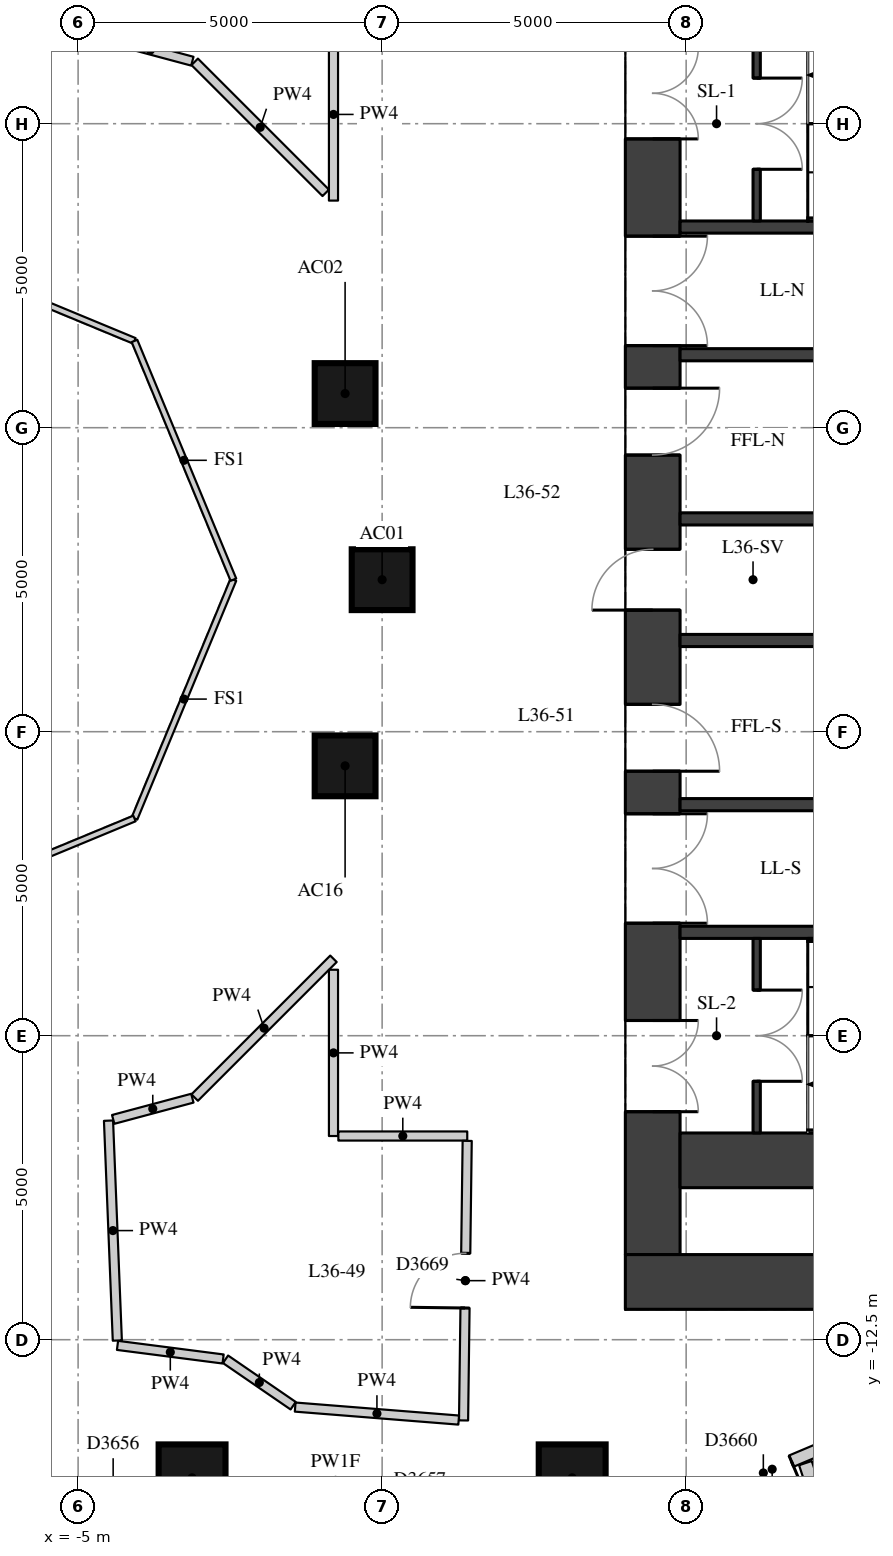
"""IFC4 building model, lengths in metres.
Left out: names, types, materials, properties, quantities, classifications, styles, units other than length and angle.
Written with IfcOpenShell. Run it as: python <this file> out.ifc"""

import sys

from ifc_helpers import new_model, si_unit, direction, frame, frame_2d, origin, origin_2d, place, context, subcontext, project, spatial, rectangle, extrude, element, fill, save


model = new_model("IFC4")
c1 = context("Model", 3, precision=1e-05, world=origin(), true_north=direction((0.0, 1.0)))
c2 = subcontext(c1, "Body", "Model", "MODEL_VIEW")
j1 = project(units=[si_unit("LENGTHUNIT", "METRE"), si_unit("PLANEANGLEUNIT", "RADIAN")], contexts=[c1])
p1 = place(None, origin())
s1 = spatial("IfcSite", under=j1, at=p1, CompositionType="ELEMENT")
p2 = place(p1, origin())
s2 = spatial("IfcBuilding", under=s1, at=p2, CompositionType="ELEMENT")
p3 = place(p2, frame((0.0, 0.0, 128.5)))
s3 = spatial("IfcBuildingStorey", under=s2, at=p3, CompositionType="ELEMENT", Elevation=128.5)
for number, where, z_axis, x_axis in (
    (1, (0.0, 0.0, 0.0), (0.0, 0.0, 1.0), (1.0, 0.0, 0.0)),
    (2, (-0.609, 3.062, 0.0), (0.0, 0.0, 1.0), (1.0, 0.0, 0.0)),
    (3, (-0.609, -3.062, 0.0), (0.0, 0.0, 1.0), (1.0, 0.0, 0.0)),
):
    element("IfcColumn", number, at=place(p3, frame(where, z_axis=z_axis, x_axis=x_axis)), inside=s3, PredefinedType="COLUMN", context=c2, shape_type="SweptSolid", body=[
        extrude(rectangle(XDim=1.0, YDim=1.0, at=origin_2d()), origin(), (0.0, 0.0, 1.0), 3.3),
    ])
for number, where, z_axis, x_axis in (
    (4, (-3.126, -14.772, 0.0), (0.0, 0.0, 1.0), (1.0, 0.0, 0.0)),
    (5, (3.126, -14.772, 0.0), (0.0, 0.0, 1.0), (1.0, 0.0, 0.0)),
):
    element("IfcColumn", number, at=place(p3, frame(where, z_axis=z_axis, x_axis=x_axis)), inside=s3, PredefinedType="COLUMN", context=c2, shape_type="SweptSolid", body=[
        extrude(rectangle(XDim=1.1, YDim=1.1, at=origin_2d()), origin(), (0.0, 0.0, 1.0), 3.3),
    ])
p4 = place(p3, frame((4.45, -11.1, 0.0), z_axis=(0.0, 0.0, 1.0), x_axis=(0.0, 1.0, 0.0)))
e6 = element("IfcWall", 6, at=p4, inside=s3, PredefinedType="SHEAR", context=c2, shape_type="SweptSolid", body=[
    extrude(rectangle(XDim=22.2, YDim=0.9, at=frame_2d((11.1, 0.0))), origin(), (0.0, 0.0, 1.0), 3.02),
])
p5 = place(p4, frame((2.35, 0.0, 0.0)))
e7 = element("IfcOpeningElement", 7, at=p5, cuts=e6, PredefinedType="OPENING", context=c2, shape_type="SweptSolid", body=[
    extrude(rectangle(XDim=1.5, YDim=2.1, at=frame_2d((0.75, 1.05))), frame((0.0, 0.46, 0.0), z_axis=(0.0, -1.0, 0.0), x_axis=(1.0, 0.0, 0.0)), (0.0, 0.0, 1.0), 0.92),
])
p6 = place(p4, frame((5.45, 0.0, 0.0)))
e8 = element("IfcOpeningElement", 8, at=p6, cuts=e6, PredefinedType="OPENING", context=c2, shape_type="SweptSolid", body=[
    extrude(rectangle(XDim=1.8, YDim=2.1, at=frame_2d((0.9, 1.05))), frame((0.0, 0.46, 0.0), z_axis=(0.0, -1.0, 0.0), x_axis=(1.0, 0.0, 0.0)), (0.0, 0.0, 1.0), 0.92),
])
p7 = place(p4, frame((7.95, 0.0, 0.0)))
e9 = element("IfcOpeningElement", 9, at=p7, cuts=e6, PredefinedType="OPENING", context=c2, shape_type="SweptSolid", body=[
    extrude(rectangle(XDim=1.1, YDim=2.1, at=frame_2d((0.55, 1.05))), frame((0.0, 0.46, 0.0), z_axis=(0.0, -1.0, 0.0), x_axis=(1.0, 0.0, 0.0)), (0.0, 0.0, 1.0), 0.92),
])
p8 = place(p4, frame((10.6, 0.0, 0.0)))
e10 = element("IfcOpeningElement", 10, at=p8, cuts=e6, PredefinedType="OPENING", context=c2, shape_type="SweptSolid", body=[
    extrude(rectangle(XDim=1.0, YDim=2.1, at=frame_2d((0.5, 1.05))), frame((0.0, 0.46, 0.0), z_axis=(0.0, -1.0, 0.0), x_axis=(1.0, 0.0, 0.0)), (0.0, 0.0, 1.0), 0.92),
])
p9 = place(p4, frame((13.15, 0.0, 0.0)))
e11 = element("IfcOpeningElement", 11, at=p9, cuts=e6, PredefinedType="OPENING", context=c2, shape_type="SweptSolid", body=[
    extrude(rectangle(XDim=1.1, YDim=2.1, at=frame_2d((0.55, 1.05))), frame((0.0, 0.46, 0.0), z_axis=(0.0, -1.0, 0.0), x_axis=(1.0, 0.0, 0.0)), (0.0, 0.0, 1.0), 0.92),
])
p10 = place(p4, frame((14.95, 0.0, 0.0)))
e12 = element("IfcOpeningElement", 12, at=p10, cuts=e6, PredefinedType="OPENING", context=c2, shape_type="SweptSolid", body=[
    extrude(rectangle(XDim=1.8, YDim=2.1, at=frame_2d((0.9, 1.05))), frame((0.0, 0.46, 0.0), z_axis=(0.0, -1.0, 0.0), x_axis=(1.0, 0.0, 0.0)), (0.0, 0.0, 1.0), 0.92),
])
p11 = place(p4, frame((18.35, 0.0, 0.0)))
e13 = element("IfcOpeningElement", 13, at=p11, cuts=e6, PredefinedType="OPENING", context=c2, shape_type="SweptSolid", body=[
    extrude(rectangle(XDim=1.5, YDim=2.1, at=frame_2d((0.75, 1.05))), frame((0.0, 0.46, 0.0), z_axis=(0.0, -1.0, 0.0), x_axis=(1.0, 0.0, 0.0)), (0.0, 0.0, 1.0), 0.92),
])
p12 = place(p3, frame((4.0, -11.55, 0.0), z_axis=(0.0, 0.0, 1.0), x_axis=(1.0, 0.0, 0.0)))
e14 = element("IfcWall", 14, at=p12, inside=s3, PredefinedType="SHEAR", context=c2, shape_type="SweptSolid", body=[
    extrude(rectangle(XDim=15.2, YDim=0.9, at=frame_2d((7.6, 0.0))), origin(), (0.0, 0.0, 1.0), 3.02),
])
p13 = place(p3, frame((4.9, -9.55, 0.0), z_axis=(0.0, 0.0, 1.0), x_axis=(1.0, 0.0, 0.0)))
e15 = element("IfcWall", 15, at=p13, inside=s3, PredefinedType="SHEAR", context=c2, shape_type="SweptSolid", body=[
    extrude(rectangle(XDim=10.2, YDim=0.9, at=frame_2d((5.1, 0.0))), origin(), (0.0, 0.0, 1.0), 3.02),
])
p14 = place(p3, frame((4.9, 5.8, 0.0), z_axis=(0.0, 0.0, 1.0), x_axis=(1.0, 0.0, 0.0)))
e16 = element("IfcWall", 16, at=p14, inside=s3, PredefinedType="SHEAR", context=c2, shape_type="SweptSolid", body=[
    extrude(rectangle(XDim=10.2, YDim=0.2, at=frame_2d((5.1, 0.0))), origin(), (0.0, 0.0, 1.0), 3.02),
])
p15 = place(p14, frame((6.75, 0.0, 0.0)))
e17 = element("IfcOpeningElement", 17, at=p15, cuts=e16, PredefinedType="OPENING", context=c2, shape_type="SweptSolid", body=[
    extrude(rectangle(XDim=1.1, YDim=2.1, at=frame_2d((0.55, 1.05))), frame((0.0, 0.11, 0.0), z_axis=(0.0, -1.0, 0.0), x_axis=(1.0, 0.0, 0.0)), (0.0, 0.0, 1.0), 0.22),
])
p16 = place(p14, frame((8.75, 0.0, 0.0)))
e18 = element("IfcOpeningElement", 18, at=p16, cuts=e16, PredefinedType="OPENING", context=c2, shape_type="SweptSolid", body=[
    extrude(rectangle(XDim=1.1, YDim=2.1, at=frame_2d((0.55, 1.05))), frame((0.0, 0.11, 0.0), z_axis=(0.0, -1.0, 0.0), x_axis=(1.0, 0.0, 0.0)), (0.0, 0.0, 1.0), 0.22),
])
p17 = place(p3, frame((4.9, 3.7, 0.0), z_axis=(0.0, 0.0, 1.0), x_axis=(1.0, 0.0, 0.0)))
e19 = element("IfcWall", 19, at=p17, inside=s3, PredefinedType="SHEAR", context=c2, shape_type="SweptSolid", body=[
    extrude(rectangle(XDim=10.2, YDim=0.2, at=frame_2d((5.1, 0.0))), origin(), (0.0, 0.0, 1.0), 3.02),
])
p18 = place(p17, frame((6.3, 0.0, 0.0)))
e20 = element("IfcOpeningElement", 20, at=p18, cuts=e19, PredefinedType="OPENING", context=c2, shape_type="SweptSolid", body=[
    extrude(rectangle(XDim=1.1, YDim=2.1, at=frame_2d((0.55, 1.05))), frame((0.0, 0.11, 0.0), z_axis=(0.0, -1.0, 0.0), x_axis=(1.0, 0.0, 0.0)), (0.0, 0.0, 1.0), 0.22),
])
p19 = place(p17, frame((8.6, 0.0, 0.0)))
e21 = element("IfcOpeningElement", 21, at=p19, cuts=e19, PredefinedType="OPENING", context=c2, shape_type="SweptSolid", body=[
    extrude(rectangle(XDim=1.1, YDim=2.1, at=frame_2d((0.55, 1.05))), frame((0.0, 0.11, 0.0), z_axis=(0.0, -1.0, 0.0), x_axis=(1.0, 0.0, 0.0)), (0.0, 0.0, 1.0), 0.22),
])
for number, where, z_axis, x_axis in (
    (22, (4.9, 1.0, 0.0), (0.0, 0.0, 1.0), (1.0, 0.0, 0.0)),
    (23, (4.9, -1.0, 0.0), (0.0, 0.0, 1.0), (1.0, 0.0, 0.0)),
):
    element("IfcWall", number, at=place(p3, frame(where, z_axis=z_axis, x_axis=x_axis)), inside=s3, PredefinedType="SHEAR", context=c2, shape_type="SweptSolid", body=[
        extrude(rectangle(XDim=10.2, YDim=0.2, at=frame_2d((5.1, 0.0))), origin(), (0.0, 0.0, 1.0), 3.02),
    ])
p20 = place(p3, frame((4.9, -3.7, 0.0), z_axis=(0.0, 0.0, 1.0), x_axis=(1.0, 0.0, 0.0)))
e24 = element("IfcWall", 24, at=p20, inside=s3, PredefinedType="SHEAR", context=c2, shape_type="SweptSolid", body=[
    extrude(rectangle(XDim=10.2, YDim=0.2, at=frame_2d((5.1, 0.0))), origin(), (0.0, 0.0, 1.0), 3.02),
])
p21 = place(p20, frame((6.3, 0.0, 0.0)))
e25 = element("IfcOpeningElement", 25, at=p21, cuts=e24, PredefinedType="OPENING", context=c2, shape_type="SweptSolid", body=[
    extrude(rectangle(XDim=1.1, YDim=2.1, at=frame_2d((0.55, 1.05))), frame((0.0, 0.11, 0.0), z_axis=(0.0, -1.0, 0.0), x_axis=(1.0, 0.0, 0.0)), (0.0, 0.0, 1.0), 0.22),
])
p22 = place(p20, frame((8.6, 0.0, 0.0)))
e26 = element("IfcOpeningElement", 26, at=p22, cuts=e24, PredefinedType="OPENING", context=c2, shape_type="SweptSolid", body=[
    extrude(rectangle(XDim=1.1, YDim=2.1, at=frame_2d((0.55, 1.05))), frame((0.0, 0.11, 0.0), z_axis=(0.0, -1.0, 0.0), x_axis=(1.0, 0.0, 0.0)), (0.0, 0.0, 1.0), 0.22),
])
p23 = place(p3, frame((4.9, -5.8, 0.0), z_axis=(0.0, 0.0, 1.0), x_axis=(1.0, 0.0, 0.0)))
e27 = element("IfcWall", 27, at=p23, inside=s3, PredefinedType="SHEAR", context=c2, shape_type="SweptSolid", body=[
    extrude(rectangle(XDim=10.2, YDim=0.2, at=frame_2d((5.1, 0.0))), origin(), (0.0, 0.0, 1.0), 3.02),
])
p24 = place(p3, frame((6.16, 5.9, 0.0), z_axis=(0.0, 0.0, 1.0), x_axis=(0.0, 1.0, 0.0)))
e28 = element("IfcWall", 28, at=p24, inside=s3, PredefinedType="SHEAR", context=c2, shape_type="SweptSolid", body=[
    extrude(rectangle(XDim=3.2, YDim=0.12, at=frame_2d((1.6, 0.0))), origin(), (0.0, 0.0, 1.0), 3.02),
])
p25 = place(p24, frame((0.85, 0.0, 0.0)))
e29 = element("IfcOpeningElement", 29, at=p25, cuts=e28, PredefinedType="OPENING", context=c2, shape_type="SweptSolid", body=[
    extrude(rectangle(XDim=1.5, YDim=2.1, at=frame_2d((0.75, 1.05))), frame((0.0, 0.07, 0.0), z_axis=(0.0, -1.0, 0.0), x_axis=(1.0, 0.0, 0.0)), (0.0, 0.0, 1.0), 0.14),
])
p26 = place(p3, frame((6.16, -9.1, 0.0), z_axis=(0.0, 0.0, 1.0), x_axis=(0.0, 1.0, 0.0)))
e30 = element("IfcWall", 30, at=p26, inside=s3, PredefinedType="SHEAR", context=c2, shape_type="SweptSolid", body=[
    extrude(rectangle(XDim=3.2, YDim=0.12, at=frame_2d((1.6, 0.0))), origin(), (0.0, 0.0, 1.0), 3.02),
])
p27 = place(p26, frame((0.85, 0.0, 0.0)))
e31 = element("IfcOpeningElement", 31, at=p27, cuts=e30, PredefinedType="OPENING", context=c2, shape_type="SweptSolid", body=[
    extrude(rectangle(XDim=1.5, YDim=2.1, at=frame_2d((0.75, 1.05))), frame((0.0, 0.07, 0.0), z_axis=(0.0, -1.0, 0.0), x_axis=(1.0, 0.0, 0.0)), (0.0, 0.0, 1.0), 0.14),
])
p28 = place(p3, frame((8.818, -13.616, 0.0), z_axis=(0.0, 0.0, 1.0), x_axis=(-0.921304705085, -0.388841407759, 0.0)))
e32 = element("IfcWall", 32, at=p28, inside=s3, PredefinedType="PARTITIONING", context=c2, shape_type="SweptSolid", body=[
    extrude(rectangle(XDim=5.217, YDim=0.2, at=frame_2d((2.608, 0.0))), origin(), (0.0, 0.0, 1.0), 3.02),
])
p29 = place(p28, frame((2.266, 0.0, 0.0)))
e33 = element("IfcOpeningElement", 33, at=p29, cuts=e32, PredefinedType="OPENING", context=c2, shape_type="SweptSolid", body=[
    extrude(rectangle(XDim=1.0, YDim=2.1, at=frame_2d((0.5, 1.05))), frame((0.0, 0.11, 0.0), z_axis=(0.0, -1.0, 0.0), x_axis=(1.0, 0.0, 0.0)), (0.0, 0.0, 1.0), 0.22),
])
p30 = place(p3, frame((-0.8, 9.07, 0.0), z_axis=(0.0, 0.0, 1.0), x_axis=(0.0, -1.0, 0.0)))
e34 = element("IfcWall", 34, at=p30, inside=s3, PredefinedType="PARTITIONING", context=c2, shape_type="SweptSolid", body=[
    extrude(rectangle(XDim=2.835, YDim=0.15, at=frame_2d((1.417, 0.0))), origin(), (0.0, 0.0, 1.0), 3.02),
])
p31 = place(p3, frame((-0.927, 6.363, 0.0), z_axis=(0.0, 0.0, 1.0), x_axis=(-0.707106781187, 0.707106781187, 0.0)))
e35 = element("IfcWall", 35, at=p31, inside=s3, PredefinedType="PARTITIONING", context=c2, shape_type="SweptSolid", body=[
    extrude(rectangle(XDim=3.048, YDim=0.15, at=frame_2d((1.524, 0.0))), origin(), (0.0, 0.0, 1.0), 3.02),
])
p32 = place(p3, frame((-3.121, 8.528, 0.0), z_axis=(0.0, 0.0, 1.0), x_axis=(-0.965941945062, 0.258758881529, 0.0)))
e36 = element("IfcWall", 36, at=p32, inside=s3, PredefinedType="PARTITIONING", context=c2, shape_type="SweptSolid", body=[
    extrude(rectangle(XDim=1.427, YDim=0.15, at=frame_2d((0.714, 0.0))), origin(), (0.0, 0.0, 1.0), 2.47),
])
p33 = place(p3, frame((-3.083, -8.518, 0.0), z_axis=(0.0, 0.0, 1.0), x_axis=(0.707106781187, 0.707106781187, 0.0)))
e37 = element("IfcWall", 37, at=p33, inside=s3, PredefinedType="PARTITIONING", context=c2, shape_type="SweptSolid", body=[
    extrude(rectangle(XDim=3.228, YDim=0.15, at=frame_2d((1.614, 0.0))), origin(), (0.0, 0.0, 1.0), 3.02),
])
p34 = place(p3, frame((-0.8, -6.415, 0.0), z_axis=(0.0, 0.0, 1.0), x_axis=(0.0, -1.0, 0.0)))
e38 = element("IfcWall", 38, at=p34, inside=s3, PredefinedType="PARTITIONING", context=c2, shape_type="SweptSolid", body=[
    extrude(rectangle(XDim=2.735, YDim=0.15, at=frame_2d((1.367, 0.0))), origin(), (0.0, 0.0, 1.0), 3.02),
])
p35 = place(p3, frame((-0.72, -9.15, 0.0), z_axis=(0.0, 0.0, 1.0), x_axis=(1.0, 0.0, 0.0)))
e39 = element("IfcWall", 39, at=p35, inside=s3, PredefinedType="PARTITIONING", context=c2, shape_type="SweptSolid", body=[
    extrude(rectangle(XDim=2.12, YDim=0.15, at=frame_2d((1.06, 0.0))), origin(), (0.0, 0.0, 1.0), 3.02),
])
p36 = place(p3, frame((1.399, -9.23, 0.0), z_axis=(0.0, 0.0, 1.0), x_axis=(-0.013008669764, -0.999915383676, 0.0)))
e40 = element("IfcWall", 40, at=p36, inside=s3, PredefinedType="PARTITIONING", context=c2, shape_type="SweptSolid", body=[
    extrude(rectangle(XDim=4.598, YDim=0.15, at=frame_2d((2.299, 0.0))), origin(), (0.0, 0.0, 1.0), 3.02),
])
p37 = place(p36, frame((1.849, 0.0, 0.0)))
e41 = element("IfcOpeningElement", 41, at=p37, cuts=e40, PredefinedType="OPENING", context=c2, shape_type="SweptSolid", body=[
    extrude(rectangle(XDim=0.9, YDim=2.1, at=frame_2d((0.45, 1.05))), frame((0.0, 0.085, 0.0), z_axis=(0.0, -1.0, 0.0), x_axis=(1.0, 0.0, 0.0)), (0.0, 0.0, 1.0), 0.17),
])
p38 = place(p3, frame((1.259, -13.822, 0.0), z_axis=(0.0, 0.0, 1.0), x_axis=(-0.996859157686, 0.079194821407, 0.0)))
e42 = element("IfcWall", 42, at=p38, inside=s3, PredefinedType="PARTITIONING", context=c2, shape_type="SweptSolid", body=[
    extrude(rectangle(XDim=2.698, YDim=0.15, at=frame_2d((1.349, 0.0))), origin(), (0.0, 0.0, 1.0), 3.02),
])
p39 = place(p3, frame((-1.463, -13.586, 0.0), z_axis=(0.0, 0.0, 1.0), x_axis=(-0.82445873192, 0.565922078878, 0.0)))
e43 = element("IfcWall", 43, at=p39, inside=s3, PredefinedType="PARTITIONING", context=c2, shape_type="SweptSolid", body=[
    extrude(rectangle(XDim=1.349, YDim=0.15, at=frame_2d((0.675, 0.0))), origin(), (0.0, 0.0, 1.0), 3.02),
])
p40 = place(p3, frame((-2.615, -12.817, 0.0), z_axis=(0.0, 0.0, 1.0), x_axis=(-0.991812078881, 0.127705912884, 0.0)))
e44 = element("IfcWall", 44, at=p40, inside=s3, PredefinedType="PARTITIONING", context=c2, shape_type="SweptSolid", body=[
    extrude(rectangle(XDim=1.751, YDim=0.15, at=frame_2d((0.875, 0.0))), origin(), (0.0, 0.0, 1.0), 3.02),
])
p41 = place(p3, frame((-4.355, -12.513, 0.0), z_axis=(0.0, 0.0, 1.0), x_axis=(-0.040070411422, 0.999196858546, 0.0)))
e45 = element("IfcWall", 45, at=p41, inside=s3, PredefinedType="PARTITIONING", context=c2, shape_type="SweptSolid", body=[
    extrude(rectangle(XDim=3.619, YDim=0.15, at=frame_2d((1.81, 0.0))), origin(), (0.0, 0.0, 1.0), 3.02),
])
p42 = place(p3, frame((-4.423, -8.877, 0.0), z_axis=(0.0, 0.0, 1.0), x_axis=(0.965912469164, 0.258868889429, 0.0)))
e46 = element("IfcWall", 46, at=p42, inside=s3, PredefinedType="PARTITIONING", context=c2, shape_type="SweptSolid", body=[
    extrude(rectangle(XDim=1.348, YDim=0.15, at=frame_2d((0.674, 0.0))), origin(), (0.0, 0.0, 1.0), 3.02),
])
p43 = place(p3, frame((9.474, -22.112, 0.0), z_axis=(0.0, 0.0, 1.0), x_axis=(-0.314540101072, 0.949244186086, 0.0)))
e47 = element("IfcWall", 47, at=p43, inside=s3, PredefinedType="PARTITIONING", context=c2, shape_type="SweptSolid", body=[
    extrude(rectangle(XDim=7.988, YDim=0.22, at=frame_2d((3.994, 0.0))), origin(), (0.0, 0.0, 1.0), 3.02),
])
for number, where, z_axis, x_axis in (
    (48, (-2.446, 0.0, 0.0), (0.0, 0.0, 1.0), (-0.383, -0.924, 0.0)),
    (49, (-4.073, -3.927, 0.0), (0.0, 0.0, 1.0), (-0.924, -0.383, 0.0)),
    (50, (-8.0, 5.554, 0.0), (0.0, 0.0, 1.0), (0.924, -0.383, 0.0)),
    (51, (-4.073, 3.927, 0.0), (0.0, 0.0, 1.0), (0.383, -0.924, 0.0)),
):
    element("IfcWall", number, at=place(p3, frame(where, z_axis=z_axis, x_axis=x_axis)), inside=s3, PredefinedType="PARTITIONING", context=c2, shape_type="SweptSolid", body=[
        extrude(rectangle(XDim=4.251, YDim=0.1, at=frame_2d((2.125, 0.0))), origin(), (0.0, 0.0, 1.0), 3.02),
    ])
p44 = place(p5, origin())
e52 = element("IfcDoor", 52, at=p44, inside=s3, OperationType="DOUBLE_DOOR_SINGLE_SWING", PredefinedType="DOOR", context=c2, shape_type="SweptSolid", body=[
    extrude(rectangle(XDim=1.5, YDim=2.1, at=frame_2d((0.75, 1.05))), frame((0.0, 0.025, 0.0), z_axis=(0.0, -1.0, 0.0), x_axis=(1.0, 0.0, 0.0)), (0.0, 0.0, 1.0), 0.05),
])
fill(e7, e52)
p45 = place(p6, origin())
e53 = element("IfcDoor", 53, at=p45, inside=s3, OperationType="DOUBLE_DOOR_SINGLE_SWING", PredefinedType="DOOR", context=c2, shape_type="SweptSolid", body=[
    extrude(rectangle(XDim=1.8, YDim=2.1, at=frame_2d((0.9, 1.05))), frame((0.0, 0.025, 0.0), z_axis=(0.0, -1.0, 0.0), x_axis=(1.0, 0.0, 0.0)), (0.0, 0.0, 1.0), 0.05),
])
fill(e8, e53)
p46 = place(p7, origin())
e54 = element("IfcDoor", 54, at=p46, inside=s3, OperationType="SINGLE_SWING_RIGHT", PredefinedType="DOOR", context=c2, shape_type="SweptSolid", body=[
    extrude(rectangle(XDim=1.1, YDim=2.1, at=frame_2d((0.55, 1.05))), frame((0.0, 0.025, 0.0), z_axis=(0.0, -1.0, 0.0), x_axis=(1.0, 0.0, 0.0)), (0.0, 0.0, 1.0), 0.05),
])
fill(e9, e54)
p47 = place(p8, origin())
e55 = element("IfcDoor", 55, at=p47, inside=s3, OperationType="SINGLE_SWING_LEFT", PredefinedType="DOOR", context=c2, shape_type="SweptSolid", body=[
    extrude(rectangle(XDim=1.0, YDim=2.1, at=frame_2d((0.5, 1.05))), frame((0.0, 0.025, 0.0), z_axis=(0.0, -1.0, 0.0), x_axis=(1.0, 0.0, 0.0)), (0.0, 0.0, 1.0), 0.05),
])
fill(e10, e55)
p48 = place(p9, origin())
e56 = element("IfcDoor", 56, at=p48, inside=s3, OperationType="SINGLE_SWING_LEFT", PredefinedType="DOOR", context=c2, shape_type="SweptSolid", body=[
    extrude(rectangle(XDim=1.1, YDim=2.1, at=frame_2d((0.55, 1.05))), frame((0.0, 0.025, 0.0), z_axis=(0.0, -1.0, 0.0), x_axis=(1.0, 0.0, 0.0)), (0.0, 0.0, 1.0), 0.05),
])
fill(e11, e56)
p49 = place(p10, origin())
e57 = element("IfcDoor", 57, at=p49, inside=s3, OperationType="DOUBLE_DOOR_SINGLE_SWING", PredefinedType="DOOR", context=c2, shape_type="SweptSolid", body=[
    extrude(rectangle(XDim=1.8, YDim=2.1, at=frame_2d((0.9, 1.05))), frame((0.0, 0.025, 0.0), z_axis=(0.0, -1.0, 0.0), x_axis=(1.0, 0.0, 0.0)), (0.0, 0.0, 1.0), 0.05),
])
fill(e12, e57)
p50 = place(p11, origin())
e58 = element("IfcDoor", 58, at=p50, inside=s3, OperationType="DOUBLE_DOOR_SINGLE_SWING", PredefinedType="DOOR", context=c2, shape_type="SweptSolid", body=[
    extrude(rectangle(XDim=1.5, YDim=2.1, at=frame_2d((0.75, 1.05))), frame((0.0, 0.025, 0.0), z_axis=(0.0, -1.0, 0.0), x_axis=(1.0, 0.0, 0.0)), (0.0, 0.0, 1.0), 0.05),
])
fill(e13, e58)
p51 = place(p25, origin())
e59 = element("IfcDoor", 59, at=p51, inside=s3, OperationType="DOUBLE_DOOR_SINGLE_SWING", PredefinedType="DOOR", context=c2, shape_type="SweptSolid", body=[
    extrude(rectangle(XDim=1.5, YDim=2.1, at=frame_2d((0.75, 1.05))), frame((0.0, 0.025, 0.0), z_axis=(0.0, -1.0, 0.0), x_axis=(1.0, 0.0, 0.0)), (0.0, 0.0, 1.0), 0.05),
])
fill(e29, e59)
p52 = place(p27, origin())
e60 = element("IfcDoor", 60, at=p52, inside=s3, OperationType="DOUBLE_DOOR_SINGLE_SWING", PredefinedType="DOOR", context=c2, shape_type="SweptSolid", body=[
    extrude(rectangle(XDim=1.5, YDim=2.1, at=frame_2d((0.75, 1.05))), frame((0.0, 0.025, 0.0), z_axis=(0.0, -1.0, 0.0), x_axis=(1.0, 0.0, 0.0)), (0.0, 0.0, 1.0), 0.05),
])
fill(e31, e60)
p53 = place(p29, origin())
e61 = element("IfcDoor", 61, at=p53, inside=s3, OperationType="SINGLE_SWING_LEFT", PredefinedType="DOOR", context=c2, shape_type="SweptSolid", body=[
    extrude(rectangle(XDim=1.0, YDim=2.1, at=frame_2d((0.5, 1.05))), frame((0.0, 0.025, 0.0), z_axis=(0.0, -1.0, 0.0), x_axis=(1.0, 0.0, 0.0)), (0.0, 0.0, 1.0), 0.05),
])
fill(e33, e61)
p54 = place(p37, origin())
e62 = element("IfcDoor", 62, at=p54, inside=s3, OperationType="SINGLE_SWING_LEFT", PredefinedType="DOOR", context=c2, shape_type="SweptSolid", body=[
    extrude(rectangle(XDim=0.9, YDim=2.1, at=frame_2d((0.45, 1.05))), frame((0.0, 0.025, 0.0), z_axis=(0.0, -1.0, 0.0), x_axis=(1.0, 0.0, 0.0)), (0.0, 0.0, 1.0), 0.05),
])
fill(e41, e62)
save(model, sys.argv[1])
